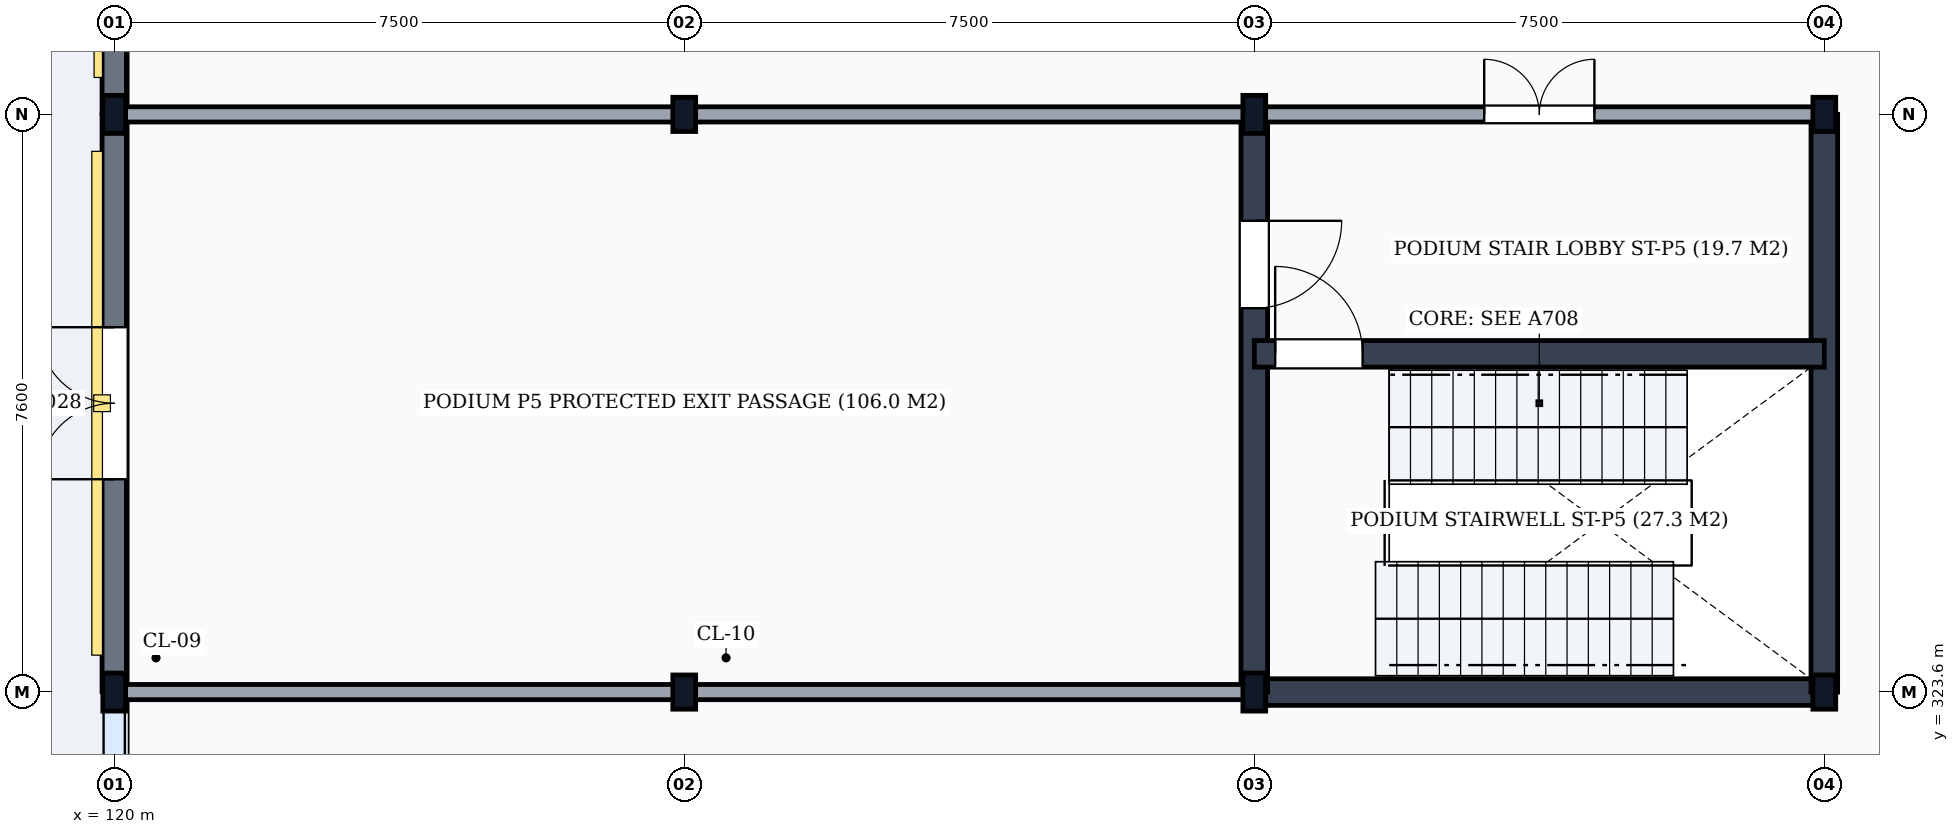
"""IFC4 building model, lengths in metres.
Left out: names, types, materials, properties, quantities, classifications, styles, units other than length and angle.
Written with IfcOpenShell. Run it as: python <this file> out.ifc"""

import sys

from ifc_helpers import new_model, si_unit, direction, frame, frame_2d, origin, origin_2d, place, context, subcontext, project, spatial, rectangle, i_section, extrude, element, fill, save


model = new_model("IFC4")
c1 = context("Model", 3, precision=1e-05, world=origin(), true_north=direction((0.0, 1.0)))
c2 = subcontext(c1, "Body", "Model", "MODEL_VIEW")
j1 = project(units=[si_unit("LENGTHUNIT", "METRE"), si_unit("PLANEANGLEUNIT", "RADIAN")], contexts=[c1])
p1 = place(None, origin())
s1 = spatial("IfcSite", under=j1, at=p1, CompositionType="ELEMENT")
p2 = place(p1, origin())
s2 = spatial("IfcBuilding", under=s1, at=p2, CompositionType="ELEMENT")
p3 = place(p2, origin())
s3 = spatial("IfcBuildingStorey", under=s2, at=p3, CompositionType="ELEMENT", Elevation=0.0)
for number, where, z_axis, x_axis in (
    (1, (120.0, 323.6, 0.0), (0.0, 0.0, 1.0), (1.0, 0.0, 0.0)),
    (2, (120.0, 331.2, 0.0), (0.0, 0.0, 1.0), (1.0, 0.0, 0.0)),
):
    element("IfcColumn", number, at=place(p3, frame(where, z_axis=z_axis, x_axis=x_axis)), inside=s3, PredefinedType="COLUMN", context=c2, shape_type="SweptSolid", body=[
        extrude(i_section(OverallWidth=0.3, OverallDepth=0.5, WebThickness=0.014, FlangeThickness=0.028, FilletRadius=0.027, at=origin_2d()), origin(), (0.0, 0.0, 1.0), 5.4),
    ])
for number, where, z_axis, x_axis in (
    (3, (127.5, 323.6, 0.0), (0.0, 0.0, 1.0), (1.0, 0.0, 0.0)),
    (4, (127.5, 331.2, 0.0), (0.0, 0.0, 1.0), (1.0, 0.0, 0.0)),
):
    element("IfcColumn", number, at=place(p3, frame(where, z_axis=z_axis, x_axis=x_axis)), inside=s3, PredefinedType="COLUMN", context=c2, shape_type="SweptSolid", body=[
        extrude(i_section(OverallWidth=0.3, OverallDepth=0.45, WebThickness=0.014, FlangeThickness=0.026, FilletRadius=0.027, at=origin_2d()), origin(), (0.0, 0.0, 1.0), 5.4),
    ])
for number, where, z_axis, x_axis in (
    (5, (135.0, 323.6, 0.0), (0.0, 0.0, 1.0), (1.0, 0.0, 0.0)),
    (6, (135.0, 331.2, 0.0), (0.0, 0.0, 1.0), (1.0, 0.0, 0.0)),
):
    element("IfcColumn", number, at=place(p3, frame(where, z_axis=z_axis, x_axis=x_axis)), inside=s3, PredefinedType="COLUMN", context=c2, shape_type="SweptSolid", body=[
        extrude(i_section(OverallWidth=0.3, OverallDepth=0.5, WebThickness=0.014, FlangeThickness=0.028, FilletRadius=0.027, at=origin_2d()), origin(), (0.0, 0.0, 1.0), 5.4),
    ])
for number, where, z_axis, x_axis in (
    (7, (142.5, 323.6, 0.0), (0.0, 0.0, 1.0), (1.0, 0.0, 0.0)),
    (8, (142.5, 331.2, 0.0), (0.0, 0.0, 1.0), (1.0, 0.0, 0.0)),
):
    element("IfcColumn", number, at=place(p3, frame(where, z_axis=z_axis, x_axis=x_axis)), inside=s3, PredefinedType="COLUMN", context=c2, shape_type="SweptSolid", body=[
        extrude(i_section(OverallWidth=0.3, OverallDepth=0.45, WebThickness=0.014, FlangeThickness=0.026, FilletRadius=0.027, at=origin_2d()), origin(), (0.0, 0.0, 1.0), 5.4),
    ])
p4 = place(p3, frame((120.0, 323.606, 0.0), z_axis=(0.0, 0.0, 1.0), x_axis=(0.0, 1.0, 0.0)))
e9 = element("IfcWall", 9, at=p4, inside=s3, PredefinedType="SOLIDWALL", context=c2, shape_type="SweptSolid", body=[
    extrude(rectangle(XDim=7.588, YDim=0.32, at=frame_2d((3.794, 0.0))), origin(), (0.0, 0.0, 1.0), 4.878),
])
p5 = place(p4, frame((2.794, 0.0, 0.0)))
e10 = element("IfcOpeningElement", 10, at=p5, cuts=e9, PredefinedType="OPENING", context=c2, shape_type="SweptSolid", body=[
    extrude(rectangle(XDim=2.0, YDim=2.55, at=frame_2d((1.0, 1.275))), frame((0.0, 0.175, 0.0), z_axis=(0.0, -1.0, 0.0), x_axis=(1.0, 0.0, 0.0)), (0.0, 0.0, 1.0), 0.35),
])
p6 = place(p3, frame((120.0, 331.206, 0.0), z_axis=(0.0, 0.0, 1.0), x_axis=(0.0, 1.0, 0.0)))
e11 = element("IfcWall", 11, at=p6, inside=s3, PredefinedType="SOLIDWALL", context=c2, shape_type="SweptSolid", body=[
    extrude(rectangle(XDim=6.788, YDim=0.32, at=frame_2d((3.394, 0.0))), origin(), (0.0, 0.0, 1.0), 4.918),
])
p7 = place(p6, frame((2.494, 0.0, 0.95)))
e12 = element("IfcOpeningElement", 12, at=p7, cuts=e11, PredefinedType="OPENING", context=c2, shape_type="SweptSolid", body=[
    extrude(rectangle(XDim=1.8, YDim=2.6, at=frame_2d((0.9, 1.3))), frame((0.0, 0.175, 0.0), z_axis=(0.0, -1.0, 0.0), x_axis=(1.0, 0.0, 0.0)), (0.0, 0.0, 1.0), 0.35),
])
p8 = place(p3, frame((120.1, 248.6, 5.4), z_axis=(0.0, 0.0, 1.0), x_axis=(0.0, 1.0, 0.0)))
e13 = element("IfcWall", 13, at=p8, inside=s3, PredefinedType="PARAPET", context=c2, shape_type="SweptSolid", body=[
    extrude(rectangle(XDim=105.2, YDim=0.18, at=frame_2d((52.6, 0.0))), origin(), (0.0, 0.0, 1.0), 1.2),
])
p9 = place(p3, frame((135.0, 323.6, 0.0), z_axis=(0.0, 0.0, 1.0), x_axis=(1.0, 0.0, 0.0)))
e14 = element("IfcWall", 14, at=p9, inside=s3, PredefinedType="SHEAR", context=c2, shape_type="SweptSolid", body=[
    extrude(rectangle(XDim=7.5, YDim=0.35, at=frame_2d((3.75, 0.0))), origin(), (0.0, 0.0, 1.0), 5.14),
])
p10 = place(p3, frame((135.0, 323.6, 0.0), z_axis=(0.0, 0.0, 1.0), x_axis=(0.0, 1.0, 0.0)))
e15 = element("IfcWall", 15, at=p10, inside=s3, PredefinedType="SHEAR", context=c2, shape_type="SweptSolid", body=[
    extrude(rectangle(XDim=7.6, YDim=0.35, at=frame_2d((3.8, 0.0))), origin(), (0.0, 0.0, 1.0), 5.14),
])
p11 = place(p10, frame((5.05, 0.0, 0.0)))
e16 = element("IfcOpeningElement", 16, at=p11, cuts=e15, PredefinedType="OPENING", context=c2, shape_type="SweptSolid", body=[
    extrude(rectangle(XDim=1.15, YDim=2.15, at=frame_2d((0.575, 1.075))), frame((0.0, 0.19, 0.0), z_axis=(0.0, -1.0, 0.0), x_axis=(1.0, 0.0, 0.0)), (0.0, 0.0, 1.0), 0.38),
])
p12 = place(p3, frame((142.5, 323.6, 0.0), z_axis=(0.0, 0.0, 1.0), x_axis=(0.0, 1.0, 0.0)))
e17 = element("IfcWall", 17, at=p12, inside=s3, PredefinedType="SHEAR", context=c2, shape_type="SweptSolid", body=[
    extrude(rectangle(XDim=7.6, YDim=0.35, at=frame_2d((3.8, 0.0))), origin(), (0.0, 0.0, 1.0), 5.14),
])
p13 = place(p3, frame((135.0, 328.05, 0.0), z_axis=(0.0, 0.0, 1.0), x_axis=(1.0, 0.0, 0.0)))
e18 = element("IfcWall", 18, at=p13, inside=s3, PredefinedType="SHEAR", context=c2, shape_type="SweptSolid", body=[
    extrude(rectangle(XDim=7.5, YDim=0.35, at=frame_2d((3.75, 0.0))), origin(), (0.0, 0.0, 1.0), 5.14),
])
p14 = place(p13, frame((0.275, 0.0, 0.0)))
e19 = element("IfcOpeningElement", 19, at=p14, cuts=e18, PredefinedType="OPENING", context=c2, shape_type="SweptSolid", body=[
    extrude(rectangle(XDim=1.15, YDim=2.15, at=frame_2d((0.575, 1.075))), frame((0.0, 0.19, 0.0), z_axis=(0.0, -1.0, 0.0), x_axis=(1.0, 0.0, 0.0)), (0.0, 0.0, 1.0), 0.38),
])
p15 = place(p3, frame((135.0, 331.2, 0.0), z_axis=(0.0, 0.0, 1.0), x_axis=(1.0, 0.0, 0.0)))
e20 = element("IfcWall", 20, at=p15, inside=s3, PredefinedType="PARTITIONING", context=c2, shape_type="SweptSolid", body=[
    extrude(rectangle(XDim=7.5, YDim=0.2, at=frame_2d((3.75, 0.0))), origin(), (0.0, 0.0, 1.0), 4.778),
])
p16 = place(p15, frame((3.025, 0.0, 0.0)))
e21 = element("IfcOpeningElement", 21, at=p16, cuts=e20, PredefinedType="OPENING", context=c2, shape_type="SweptSolid", body=[
    extrude(rectangle(XDim=1.45, YDim=2.2, at=frame_2d((0.725, 1.1))), frame((0.0, 0.115, 0.0), z_axis=(0.0, -1.0, 0.0), x_axis=(1.0, 0.0, 0.0)), (0.0, 0.0, 1.0), 0.23),
])
for number, where, z_axis, x_axis in (
    (22, (120.0, 323.6, 0.0), (0.0, 0.0, 1.0), (1.0, 0.0, 0.0)),
    (23, (120.0, 331.2, 0.0), (0.0, 0.0, 1.0), (1.0, 0.0, 0.0)),
):
    element("IfcWall", number, at=place(p3, frame(where, z_axis=z_axis, x_axis=x_axis)), inside=s3, PredefinedType="PARTITIONING", context=c2, shape_type="SweptSolid", body=[
        extrude(rectangle(XDim=15.0, YDim=0.2, at=frame_2d((7.5, 0.0))), origin(), (0.0, 0.0, 1.0), 4.788),
    ])
p17 = place(p5, origin())
e24 = element("IfcDoor", 24, at=p17, inside=s3, OperationType="DOUBLE_DOOR_SINGLE_SWING", PredefinedType="DOOR", context=c2, shape_type="SweptSolid", body=[
    extrude(rectangle(XDim=2.0, YDim=2.55, at=frame_2d((1.0, 1.275))), frame((0.0, 0.025, 0.0), z_axis=(0.0, -1.0, 0.0), x_axis=(1.0, 0.0, 0.0)), (0.0, 0.0, 1.0), 0.05),
])
fill(e10, e24)
p18 = place(p14, origin())
e25 = element("IfcDoor", 25, at=p18, inside=s3, OperationType="SINGLE_SWING_LEFT", PredefinedType="DOOR", context=c2, shape_type="SweptSolid", body=[
    extrude(rectangle(XDim=1.15, YDim=2.15, at=frame_2d((0.575, 1.075))), frame((0.0, 0.025, 0.0), z_axis=(0.0, -1.0, 0.0), x_axis=(1.0, 0.0, 0.0)), (0.0, 0.0, 1.0), 0.05),
])
fill(e19, e25)
p19 = place(p11, origin())
e26 = element("IfcDoor", 26, at=p19, inside=s3, OperationType="SINGLE_SWING_RIGHT", PredefinedType="DOOR", context=c2, shape_type="SweptSolid", body=[
    extrude(rectangle(XDim=1.15, YDim=2.15, at=frame_2d((0.575, 1.075))), frame((0.0, 0.025, 0.0), z_axis=(0.0, -1.0, 0.0), x_axis=(1.0, 0.0, 0.0)), (0.0, 0.0, 1.0), 0.05),
])
fill(e16, e26)
p20 = place(p16, origin())
e27 = element("IfcDoor", 27, at=p20, inside=s3, OperationType="DOUBLE_DOOR_SINGLE_SWING", PredefinedType="DOOR", context=c2, shape_type="SweptSolid", body=[
    extrude(rectangle(XDim=1.45, YDim=2.2, at=frame_2d((0.725, 1.1))), frame((0.0, 0.025, 0.0), z_axis=(0.0, -1.0, 0.0), x_axis=(1.0, 0.0, 0.0)), (0.0, 0.0, 1.0), 0.05),
])
fill(e21, e27)
save(model, sys.argv[1])
